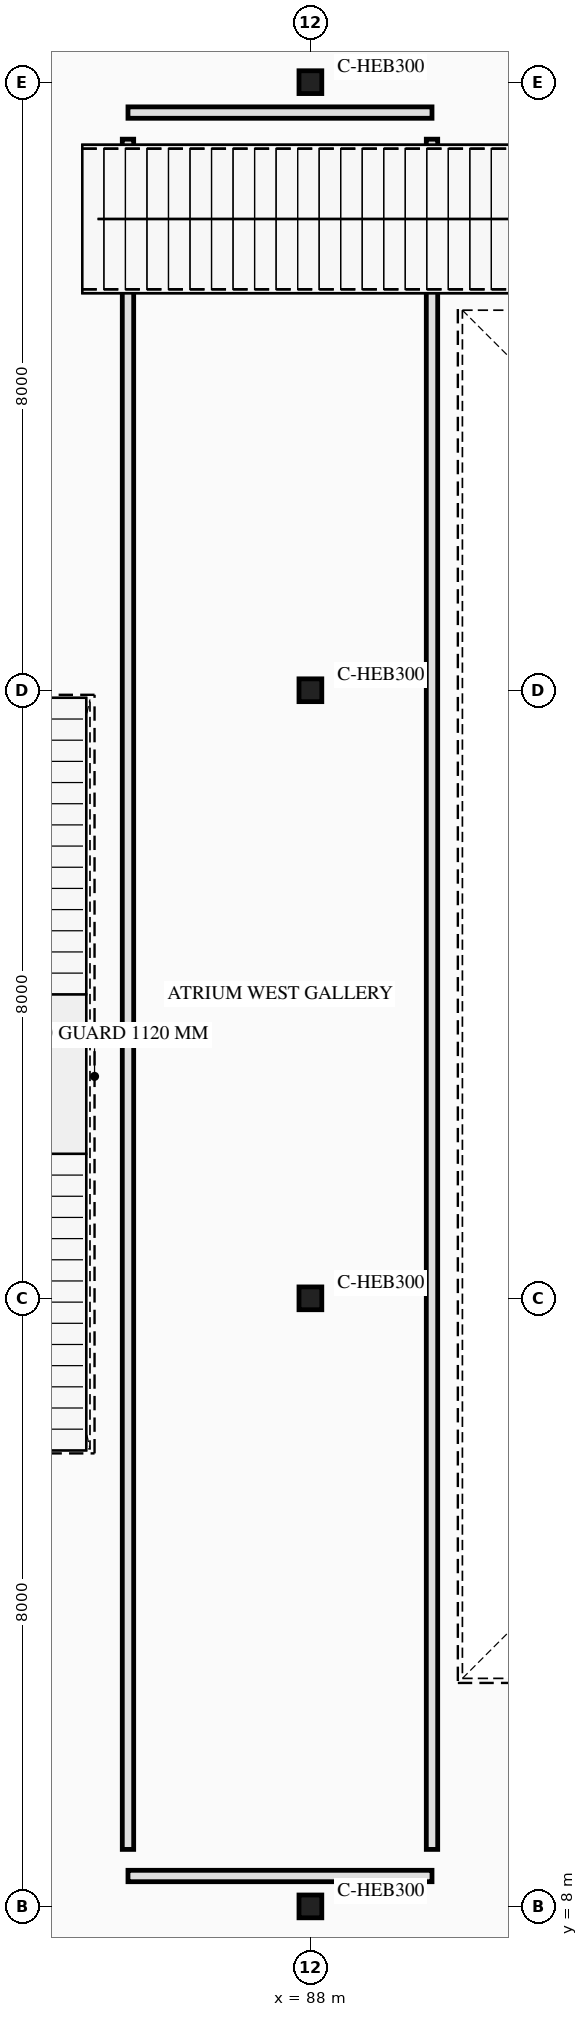
"""IFC4 building model, lengths in metres.
Left out: names, types, materials, properties, quantities, classifications, styles, units other than length and angle.
Written with IfcOpenShell. Run it as: python <this file> out.ifc"""

import sys

from ifc_helpers import new_model, si_unit, direction, frame, frame_2d, origin, origin_2d, place, context, subcontext, project, spatial, rectangle, i_section, extrude, element, save


model = new_model("IFC4")
c1 = context("Model", 3, precision=1e-05, world=origin(), true_north=direction((0.0, 1.0)))
c2 = subcontext(c1, "Body", "Model", "MODEL_VIEW")
j1 = project(units=[si_unit("LENGTHUNIT", "METRE"), si_unit("PLANEANGLEUNIT", "RADIAN")], contexts=[c1])
p1 = place(None, origin())
s1 = spatial("IfcSite", under=j1, at=p1, CompositionType="ELEMENT")
p2 = place(p1, origin())
s2 = spatial("IfcBuilding", under=s1, at=p2, CompositionType="ELEMENT")
p3 = place(p2, frame((0.0, 0.0, 9.6)))
s3 = spatial("IfcBuildingStorey", under=s2, at=p3, CompositionType="ELEMENT", Elevation=9.6)
for number, where, z_axis, x_axis in (
    (1, (88.0, 8.0, 0.0), (0.0, 0.0, 1.0), (1.0, 0.0, 0.0)),
    (2, (88.0, 16.0, 0.0), (0.0, 0.0, 1.0), (1.0, 0.0, 0.0)),
    (3, (88.0, 24.0, 0.0), (0.0, 0.0, 1.0), (1.0, 0.0, 0.0)),
    (4, (88.0, 32.0, 0.0), (0.0, 0.0, 1.0), (1.0, 0.0, 0.0)),
):
    element("IfcColumn", number, at=place(p3, frame(where, z_axis=z_axis, x_axis=x_axis)), inside=s3, PredefinedType="COLUMN", context=c2, shape_type="SweptSolid", body=[
        extrude(i_section(OverallWidth=0.3, OverallDepth=0.3, WebThickness=0.011, FlangeThickness=0.019, FilletRadius=0.027, at=origin_2d()), origin(), (0.0, 0.0, 1.0), 8.0),
    ])
for number, where, z_axis, x_axis in (
    (5, (85.6, 31.6, 0.0), (0.0, 0.0, 1.0), (1.0, 0.0, 0.0)),
    (6, (85.6, 8.4, 0.0), (0.0, 0.0, 1.0), (1.0, 0.0, 0.0)),
):
    element("IfcWall", number, at=place(p3, frame(where, z_axis=z_axis, x_axis=x_axis)), inside=s3, PredefinedType="PARTITIONING", context=c2, shape_type="SweptSolid", body=[
        extrude(rectangle(XDim=4.0, YDim=0.15, at=frame_2d((2.0, 0.0))), origin(), (0.0, 0.0, 1.0), 7.74),
    ])
for number, where, z_axis, x_axis in (
    (7, (85.6, 8.75, 0.0), (0.0, 0.0, 1.0), (0.0, 1.0, 0.0)),
    (8, (89.6, 8.75, 0.0), (0.0, 0.0, 1.0), (0.0, 1.0, 0.0)),
):
    element("IfcWall", number, at=place(p3, frame(where, z_axis=z_axis, x_axis=x_axis)), inside=s3, PredefinedType="PARTITIONING", context=c2, shape_type="SweptSolid", body=[
        extrude(rectangle(XDim=22.5, YDim=0.15, at=frame_2d((11.25, 0.0))), origin(), (0.0, 0.0, 1.0), 7.74),
    ])
save(model, sys.argv[1])
